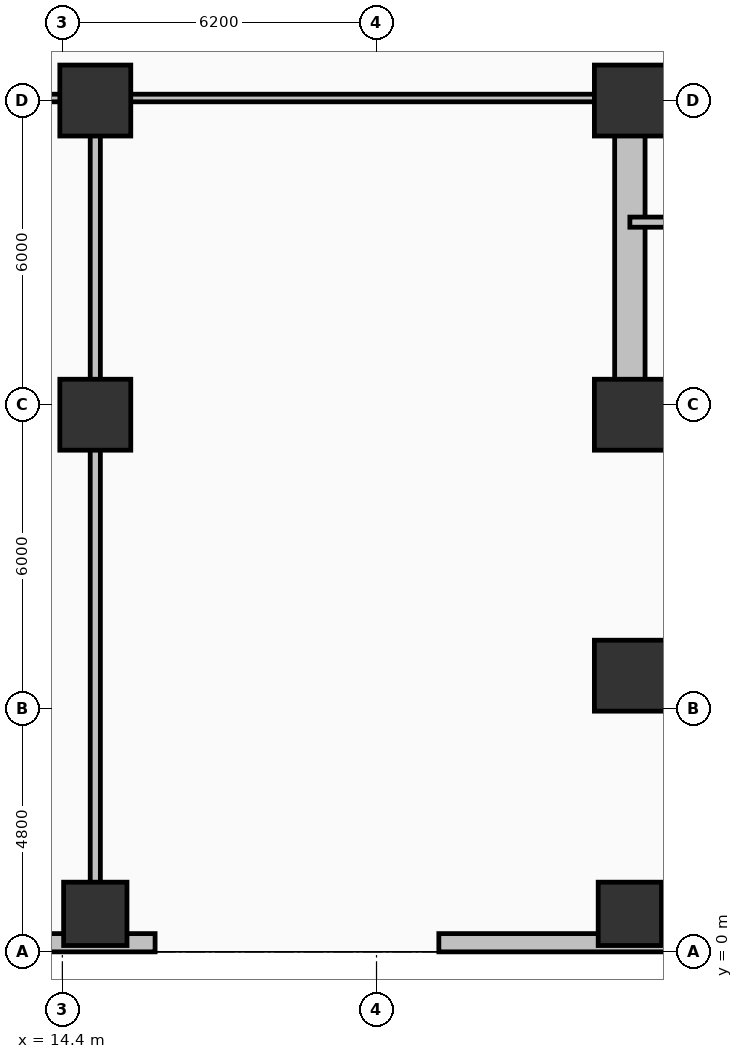
"""IFC4 building model, lengths in metres.
Left out: names, types, materials, properties, quantities, classifications, styles, units other than length and angle.
Written with IfcOpenShell. Run it as: python <this file> out.ifc"""

import sys

from ifc_helpers import new_model, si_unit, direction, frame, frame_2d, origin, origin_2d, place, context, subcontext, project, spatial, rectangle, extrude, element, fill, save


model = new_model("IFC4")
c1 = context("Model", 3, precision=1e-05, world=origin(), true_north=direction((0.0, 1.0)))
c2 = subcontext(c1, "Body", "Model", "MODEL_VIEW")
j1 = project(units=[si_unit("LENGTHUNIT", "METRE"), si_unit("PLANEANGLEUNIT", "RADIAN")], contexts=[c1])
p1 = place(None, origin())
s1 = spatial("IfcSite", under=j1, at=p1, CompositionType="ELEMENT")
p2 = place(p1, origin())
s2 = spatial("IfcBuilding", under=s1, at=p2, CompositionType="ELEMENT")
p3 = place(p2, frame((0.0, 0.0, 11.1)))
s3 = spatial("IfcBuildingStorey", under=s2, at=p3, CompositionType="ELEMENT", Elevation=11.1)
p4 = place(p3, frame((52.8, 10.6, 0.0), z_axis=(0.0, 0.0, 1.0), x_axis=(-1.0, 0.0, 0.0)))
e1 = element("IfcWall", 1, at=p4, inside=s3, PredefinedType="SHEAR", context=c2, shape_type="SweptSolid", body=[
    extrude(rectangle(XDim=27.2, YDim=0.6, at=frame_2d((13.6, 0.0))), origin(), (0.0, 0.0, 1.0), 4.5),
])
p5 = place(p3, frame((25.6, 10.9, 0.0), z_axis=(0.0, 0.0, 1.0), x_axis=(0.0, 1.0, 0.0)))
e2 = element("IfcWall", 2, at=p5, inside=s3, PredefinedType="SHEAR", context=c2, shape_type="SweptSolid", body=[
    extrude(rectangle(XDim=5.6, YDim=0.6, at=frame_2d((2.8, 0.0))), origin(), (0.0, 0.0, 1.0), 4.5),
])
p6 = place(p3, frame((25.6, 16.8, 0.0), z_axis=(0.0, 0.0, 1.0), x_axis=(1.0, 0.0, 0.0)))
e3 = element("IfcWall", 3, at=p6, inside=s3, PredefinedType="SHEAR", context=c2, shape_type="SweptSolid", body=[
    extrude(rectangle(XDim=27.2, YDim=0.6, at=frame_2d((13.6, 0.0))), origin(), (0.0, 0.0, 1.0), 4.5),
])
p7 = place(p6, frame((1.9, 0.0, 0.0)))
e4 = element("IfcOpeningElement", 4, at=p7, cuts=e3, PredefinedType="OPENING", context=c2, shape_type="SweptSolid", body=[
    extrude(rectangle(XDim=1.1, YDim=2.15, at=frame_2d((0.55, 1.075))), frame((0.0, 0.31, 0.0), z_axis=(0.0, -1.0, 0.0), x_axis=(1.0, 0.0, 0.0)), (0.0, 0.0, 1.0), 0.62),
])
p8 = place(p6, frame((13.0, 0.0, 0.0)))
e5 = element("IfcOpeningElement", 5, at=p8, cuts=e3, PredefinedType="OPENING", context=c2, shape_type="SweptSolid", body=[
    extrude(rectangle(XDim=1.2, YDim=2.15, at=frame_2d((0.6, 1.075))), frame((0.0, 0.31, 0.0), z_axis=(0.0, -1.0, 0.0), x_axis=(1.0, 0.0, 0.0)), (0.0, 0.0, 1.0), 0.62),
])
p9 = place(p6, frame((20.4, 0.0, 0.0)))
e6 = element("IfcOpeningElement", 6, at=p9, cuts=e3, PredefinedType="OPENING", context=c2, shape_type="SweptSolid", body=[
    extrude(rectangle(XDim=1.3, YDim=2.2, at=frame_2d((0.65, 1.1))), frame((0.0, 0.31, 0.0), z_axis=(0.0, -1.0, 0.0), x_axis=(1.0, 0.0, 0.0)), (0.0, 0.0, 1.0), 0.62),
])
p10 = place(p6, frame((24.65, 0.0, 0.0)))
e7 = element("IfcOpeningElement", 7, at=p10, cuts=e3, PredefinedType="OPENING", context=c2, shape_type="SweptSolid", body=[
    extrude(rectangle(XDim=0.85, YDim=2.1, at=frame_2d((0.425, 1.05))), frame((0.0, 0.31, 0.0), z_axis=(0.0, -1.0, 0.0), x_axis=(1.0, 0.0, 0.0)), (0.0, 0.0, 1.0), 0.62),
])
for number, where, z_axis, x_axis in (
    (8, (25.6, 10.6, 0.0), (0.0, 0.0, 1.0), (1.0, 0.0, 0.0)),
    (9, (25.6, 16.8, 0.0), (0.0, 0.0, 1.0), (1.0, 0.0, 0.0)),
):
    element("IfcColumn", number, at=place(p3, frame(where, z_axis=z_axis, x_axis=x_axis)), inside=s3, PredefinedType="COLUMN", context=c2, shape_type="SweptSolid", body=[
        extrude(rectangle(XDim=1.4, YDim=1.4, at=origin_2d()), origin(), (0.0, 0.0, 1.0), 4.5),
    ])
for number, where, z_axis, x_axis in (
    (10, (15.05, 0.75, 0.0), (0.0, 0.0, 1.0), (1.0, 0.0, 0.0)),
    (11, (25.6, 0.75, 0.0), (0.0, 0.0, 1.0), (1.0, 0.0, 0.0)),
):
    element("IfcColumn", number, at=place(p3, frame(where, z_axis=z_axis, x_axis=x_axis)), inside=s3, PredefinedType="COLUMN", context=c2, shape_type="SweptSolid", body=[
        extrude(rectangle(XDim=1.25, YDim=1.25, at=origin_2d()), origin(), (0.0, 0.0, 1.0), 4.5),
    ])
for number, where, z_axis, x_axis in (
    (12, (25.6, 5.45, 0.0), (0.0, 0.0, 1.0), (1.0, 0.0, 0.0)),
    (13, (15.05, 10.6, 0.0), (0.0, 0.0, 1.0), (1.0, 0.0, 0.0)),
    (14, (15.05, 16.8, 0.0), (0.0, 0.0, 1.0), (1.0, 0.0, 0.0)),
):
    element("IfcColumn", number, at=place(p3, frame(where, z_axis=z_axis, x_axis=x_axis)), inside=s3, PredefinedType="COLUMN", context=c2, shape_type="SweptSolid", body=[
        extrude(rectangle(XDim=1.4, YDim=1.4, at=origin_2d()), origin(), (0.0, 0.0, 1.0), 4.5),
    ])
p11 = place(p3, frame((0.98, 0.18, 0.0), z_axis=(0.0, 0.0, 1.0), x_axis=(1.0, 0.0, 0.0)))
e15 = element("IfcWall", 15, at=p11, inside=s3, PredefinedType="SOLIDWALL", context=c2, shape_type="SweptSolid", body=[
    extrude(rectangle(XDim=15.25, YDim=0.36, at=frame_2d((7.625, 0.0))), origin(), (0.0, 0.0, 1.0), 3.48),
])
p12 = place(p11, frame((1.494, 0.0, 0.9)))
e16 = element("IfcOpeningElement", 16, at=p12, cuts=e15, PredefinedType="OPENING", context=c2, shape_type="SweptSolid", body=[
    extrude(rectangle(XDim=1.8, YDim=2.1, at=frame_2d((0.9, 1.05))), frame((0.0, 0.19, 0.0), z_axis=(0.0, -1.0, 0.0), x_axis=(1.0, 0.0, 0.0)), (0.0, 0.0, 1.0), 0.38),
])
p13 = place(p11, frame((8.469, 0.0, 0.9)))
e17 = element("IfcOpeningElement", 17, at=p13, cuts=e15, PredefinedType="OPENING", context=c2, shape_type="SweptSolid", body=[
    extrude(rectangle(XDim=1.8, YDim=2.1, at=frame_2d((0.9, 1.05))), frame((0.0, 0.19, 0.0), z_axis=(0.0, -1.0, 0.0), x_axis=(1.0, 0.0, 0.0)), (0.0, 0.0, 1.0), 0.38),
])
p14 = place(p11, frame((10.906, 0.0, 0.9)))
e18 = element("IfcOpeningElement", 18, at=p14, cuts=e15, PredefinedType="OPENING", context=c2, shape_type="SweptSolid", body=[
    extrude(rectangle(XDim=1.8, YDim=2.1, at=frame_2d((0.9, 1.05))), frame((0.0, 0.19, 0.0), z_axis=(0.0, -1.0, 0.0), x_axis=(1.0, 0.0, 0.0)), (0.0, 0.0, 1.0), 0.38),
])
p15 = place(p3, frame((21.83, 0.18, 0.0), z_axis=(0.0, 0.0, 1.0), x_axis=(1.0, 0.0, 0.0)))
e19 = element("IfcWall", 19, at=p15, inside=s3, PredefinedType="SOLIDWALL", context=c2, shape_type="SweptSolid", body=[
    extrude(rectangle(XDim=55.59, YDim=0.36, at=frame_2d((27.795, 0.0))), origin(), (0.0, 0.0, 1.0), 3.48),
])
p16 = place(p15, frame((0.747, 0.0, 0.9)))
e20 = element("IfcOpeningElement", 20, at=p16, cuts=e19, PredefinedType="OPENING", context=c2, shape_type="SweptSolid", body=[
    extrude(rectangle(XDim=1.8, YDim=2.1, at=frame_2d((0.9, 1.05))), frame((0.0, 0.19, 0.0), z_axis=(0.0, -1.0, 0.0), x_axis=(1.0, 0.0, 0.0)), (0.0, 0.0, 1.0), 0.38),
])
p17 = place(p15, frame((5.19, 0.0, 0.9)))
e21 = element("IfcOpeningElement", 21, at=p17, cuts=e19, PredefinedType="OPENING", context=c2, shape_type="SweptSolid", body=[
    extrude(rectangle(XDim=1.8, YDim=2.1, at=frame_2d((0.9, 1.05))), frame((0.0, 0.19, 0.0), z_axis=(0.0, -1.0, 0.0), x_axis=(1.0, 0.0, 0.0)), (0.0, 0.0, 1.0), 0.38),
])
p18 = place(p15, frame((8.233, 0.0, 0.9)))
e22 = element("IfcOpeningElement", 22, at=p18, cuts=e19, PredefinedType="OPENING", context=c2, shape_type="SweptSolid", body=[
    extrude(rectangle(XDim=1.8, YDim=2.1, at=frame_2d((0.9, 1.05))), frame((0.0, 0.19, 0.0), z_axis=(0.0, -1.0, 0.0), x_axis=(1.0, 0.0, 0.0)), (0.0, 0.0, 1.0), 0.38),
])
p19 = place(p15, frame((11.626, 0.0, 0.9)))
e23 = element("IfcOpeningElement", 23, at=p19, cuts=e19, PredefinedType="OPENING", context=c2, shape_type="SweptSolid", body=[
    extrude(rectangle(XDim=1.8, YDim=2.1, at=frame_2d((0.9, 1.05))), frame((0.0, 0.19, 0.0), z_axis=(0.0, -1.0, 0.0), x_axis=(1.0, 0.0, 0.0)), (0.0, 0.0, 1.0), 0.38),
])
p20 = place(p15, frame((14.319, 0.0, 0.9)))
e24 = element("IfcOpeningElement", 24, at=p20, cuts=e19, PredefinedType="OPENING", context=c2, shape_type="SweptSolid", body=[
    extrude(rectangle(XDim=1.8, YDim=2.1, at=frame_2d((0.9, 1.05))), frame((0.0, 0.19, 0.0), z_axis=(0.0, -1.0, 0.0), x_axis=(1.0, 0.0, 0.0)), (0.0, 0.0, 1.0), 0.38),
])
p21 = place(p15, frame((18.762, 0.0, 0.9)))
e25 = element("IfcOpeningElement", 25, at=p21, cuts=e19, PredefinedType="OPENING", context=c2, shape_type="SweptSolid", body=[
    extrude(rectangle(XDim=1.8, YDim=2.1, at=frame_2d((0.9, 1.05))), frame((0.0, 0.19, 0.0), z_axis=(0.0, -1.0, 0.0), x_axis=(1.0, 0.0, 0.0)), (0.0, 0.0, 1.0), 0.38),
])
p22 = place(p15, frame((21.805, 0.0, 0.9)))
e26 = element("IfcOpeningElement", 26, at=p22, cuts=e19, PredefinedType="OPENING", context=c2, shape_type="SweptSolid", body=[
    extrude(rectangle(XDim=1.8, YDim=2.1, at=frame_2d((0.9, 1.05))), frame((0.0, 0.19, 0.0), z_axis=(0.0, -1.0, 0.0), x_axis=(1.0, 0.0, 0.0)), (0.0, 0.0, 1.0), 0.38),
])
p23 = place(p15, frame((25.198, 0.0, 0.9)))
e27 = element("IfcOpeningElement", 27, at=p23, cuts=e19, PredefinedType="OPENING", context=c2, shape_type="SweptSolid", body=[
    extrude(rectangle(XDim=1.8, YDim=2.1, at=frame_2d((0.9, 1.05))), frame((0.0, 0.19, 0.0), z_axis=(0.0, -1.0, 0.0), x_axis=(1.0, 0.0, 0.0)), (0.0, 0.0, 1.0), 0.38),
])
p24 = place(p15, frame((27.892, 0.0, 0.9)))
e28 = element("IfcOpeningElement", 28, at=p24, cuts=e19, PredefinedType="OPENING", context=c2, shape_type="SweptSolid", body=[
    extrude(rectangle(XDim=1.8, YDim=2.1, at=frame_2d((0.9, 1.05))), frame((0.0, 0.19, 0.0), z_axis=(0.0, -1.0, 0.0), x_axis=(1.0, 0.0, 0.0)), (0.0, 0.0, 1.0), 0.38),
])
p25 = place(p15, frame((32.335, 0.0, 0.9)))
e29 = element("IfcOpeningElement", 29, at=p25, cuts=e19, PredefinedType="OPENING", context=c2, shape_type="SweptSolid", body=[
    extrude(rectangle(XDim=1.8, YDim=2.1, at=frame_2d((0.9, 1.05))), frame((0.0, 0.19, 0.0), z_axis=(0.0, -1.0, 0.0), x_axis=(1.0, 0.0, 0.0)), (0.0, 0.0, 1.0), 0.38),
])
p26 = place(p15, frame((35.378, 0.0, 0.9)))
e30 = element("IfcOpeningElement", 30, at=p26, cuts=e19, PredefinedType="OPENING", context=c2, shape_type="SweptSolid", body=[
    extrude(rectangle(XDim=1.8, YDim=2.1, at=frame_2d((0.9, 1.05))), frame((0.0, 0.19, 0.0), z_axis=(0.0, -1.0, 0.0), x_axis=(1.0, 0.0, 0.0)), (0.0, 0.0, 1.0), 0.38),
])
p27 = place(p15, frame((38.421, 0.0, 0.9)))
e31 = element("IfcOpeningElement", 31, at=p27, cuts=e19, PredefinedType="OPENING", context=c2, shape_type="SweptSolid", body=[
    extrude(rectangle(XDim=1.8, YDim=2.1, at=frame_2d((0.9, 1.05))), frame((0.0, 0.19, 0.0), z_axis=(0.0, -1.0, 0.0), x_axis=(1.0, 0.0, 0.0)), (0.0, 0.0, 1.0), 0.38),
])
p28 = place(p15, frame((42.864, 0.0, 0.9)))
e32 = element("IfcOpeningElement", 32, at=p28, cuts=e19, PredefinedType="OPENING", context=c2, shape_type="SweptSolid", body=[
    extrude(rectangle(XDim=1.8, YDim=2.1, at=frame_2d((0.9, 1.05))), frame((0.0, 0.19, 0.0), z_axis=(0.0, -1.0, 0.0), x_axis=(1.0, 0.0, 0.0)), (0.0, 0.0, 1.0), 0.38),
])
p29 = place(p15, frame((45.557, 0.0, 0.9)))
e33 = element("IfcOpeningElement", 33, at=p29, cuts=e19, PredefinedType="OPENING", context=c2, shape_type="SweptSolid", body=[
    extrude(rectangle(XDim=1.8, YDim=2.1, at=frame_2d((0.9, 1.05))), frame((0.0, 0.19, 0.0), z_axis=(0.0, -1.0, 0.0), x_axis=(1.0, 0.0, 0.0)), (0.0, 0.0, 1.0), 0.38),
])
p30 = place(p15, frame((52.344, 0.0, 0.9)))
e34 = element("IfcOpeningElement", 34, at=p30, cuts=e19, PredefinedType="OPENING", context=c2, shape_type="SweptSolid", body=[
    extrude(rectangle(XDim=1.8, YDim=2.1, at=frame_2d((0.9, 1.05))), frame((0.0, 0.19, 0.0), z_axis=(0.0, -1.0, 0.0), x_axis=(1.0, 0.0, 0.0)), (0.0, 0.0, 1.0), 0.38),
])
p31 = place(p3, frame((25.6, 14.4, 0.0), z_axis=(0.0, 0.0, 1.0), x_axis=(1.0, 0.0, 0.0)))
e35 = element("IfcWall", 35, at=p31, inside=s3, PredefinedType="SHEAR", context=c2, shape_type="SweptSolid", body=[
    extrude(rectangle(XDim=9.55, YDim=0.2, at=frame_2d((4.775, 0.0))), origin(), (0.0, 0.0, 1.0), 4.5),
])
p32 = place(p31, frame((1.05, 0.0, 0.0)))
e36 = element("IfcOpeningElement", 36, at=p32, cuts=e35, PredefinedType="OPENING", context=c2, shape_type="SweptSolid", body=[
    extrude(rectangle(XDim=1.1, YDim=2.15, at=frame_2d((0.55, 1.075))), frame((0.0, 0.11, 0.0), z_axis=(0.0, -1.0, 0.0), x_axis=(1.0, 0.0, 0.0)), (0.0, 0.0, 1.0), 0.22),
])
p33 = place(p3, frame((15.05, 0.4, 0.0), z_axis=(0.0, 0.0, 1.0), x_axis=(0.0, 1.0, 0.0)))
e37 = element("IfcWall", 37, at=p33, inside=s3, PredefinedType="PARTITIONING", context=c2, shape_type="SweptSolid", body=[
    extrude(rectangle(XDim=16.4, YDim=0.2, at=frame_2d((8.2, 0.0))), origin(), (0.0, 0.0, 1.0), 3.42),
])
p34 = place(p33, frame((5.5, 0.0, 0.0)))
e38 = element("IfcOpeningElement", 38, at=p34, cuts=e37, PredefinedType="OPENING", context=c2, shape_type="SweptSolid", body=[
    extrude(rectangle(XDim=1.0, YDim=2.15, at=frame_2d((0.5, 1.075))), frame((0.0, 0.11, 0.0), z_axis=(0.0, -1.0, 0.0), x_axis=(1.0, 0.0, 0.0)), (0.0, 0.0, 1.0), 0.22),
])
p35 = place(p3, frame((12.0, 16.85, 0.0), z_axis=(0.0, 0.0, 1.0), x_axis=(1.0, 0.0, 0.0)))
e39 = element("IfcWall", 39, at=p35, inside=s3, PredefinedType="PARTITIONING", context=c2, shape_type="SweptSolid", body=[
    extrude(rectangle(XDim=13.25, YDim=0.15, at=frame_2d((6.625, 0.0))), origin(), (0.0, 0.0, 1.0), 3.42),
])
p36 = place(p35, frame((7.5, 0.0, 0.0)))
e40 = element("IfcOpeningElement", 40, at=p36, cuts=e39, PredefinedType="OPENING", context=c2, shape_type="SweptSolid", body=[
    extrude(rectangle(XDim=1.0, YDim=2.15, at=frame_2d((0.5, 1.075))), frame((0.0, 0.085, 0.0), z_axis=(0.0, -1.0, 0.0), x_axis=(1.0, 0.0, 0.0)), (0.0, 0.0, 1.0), 0.17),
])
p37 = place(p16, origin())
e41 = element("IfcWindow", 41, at=p37, inside=s3, PartitioningType="SINGLE_PANEL", PredefinedType="WINDOW", context=c2, shape_type="SweptSolid", body=[
    extrude(rectangle(XDim=1.8, YDim=2.1, at=frame_2d((0.9, 1.05))), frame((0.0, 0.03, 0.0), z_axis=(0.0, -1.0, 0.0), x_axis=(1.0, 0.0, 0.0)), (0.0, 0.0, 1.0), 0.06),
])
fill(e20, e41)
p38 = place(p34, origin())
e42 = element("IfcDoor", 42, at=p38, inside=s3, OperationType="SINGLE_SWING_LEFT", PredefinedType="DOOR", context=c2, shape_type="SweptSolid", body=[
    extrude(rectangle(XDim=1.0, YDim=2.15, at=frame_2d((0.5, 1.075))), frame((0.0, 0.025, 0.0), z_axis=(0.0, -1.0, 0.0), x_axis=(1.0, 0.0, 0.0)), (0.0, 0.0, 1.0), 0.05),
])
fill(e38, e42)
p39 = place(p36, origin())
e43 = element("IfcDoor", 43, at=p39, inside=s3, OperationType="SINGLE_SWING_LEFT", PredefinedType="DOOR", context=c2, shape_type="SweptSolid", body=[
    extrude(rectangle(XDim=1.0, YDim=2.15, at=frame_2d((0.5, 1.075))), frame((0.0, 0.025, 0.0), z_axis=(0.0, -1.0, 0.0), x_axis=(1.0, 0.0, 0.0)), (0.0, 0.0, 1.0), 0.05),
])
fill(e40, e43)
save(model, sys.argv[1])
